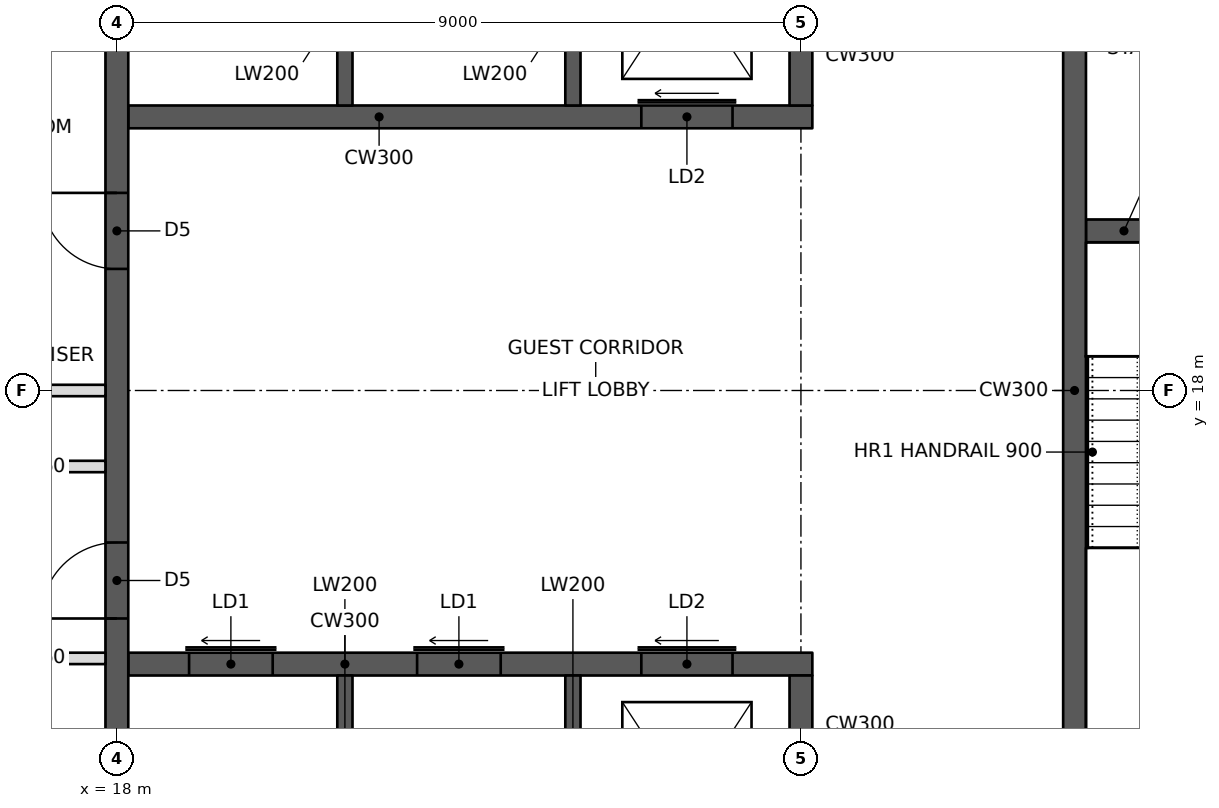
"""IFC4 building model, lengths in metres.
Left out: names, types, materials, properties, quantities, classifications, styles, units other than length and angle.
Written with IfcOpenShell. Run it as: python <this file> out.ifc"""

import sys

from ifc_helpers import new_model, si_unit, direction, frame, frame_2d, origin, place, context, subcontext, project, spatial, rectangle, extrude, element, fill, save


model = new_model("IFC4")
c1 = context("Model", 3, precision=1e-05, world=origin(), true_north=direction((0.0, 1.0)))
c2 = subcontext(c1, "Body", "Model", "MODEL_VIEW")
j1 = project(units=[si_unit("LENGTHUNIT", "METRE"), si_unit("PLANEANGLEUNIT", "RADIAN")], contexts=[c1])
p1 = place(None, origin())
s1 = spatial("IfcSite", under=j1, at=p1, CompositionType="ELEMENT")
p2 = place(p1, origin())
s2 = spatial("IfcBuilding", under=s1, at=p2, CompositionType="ELEMENT")
p3 = place(p2, frame((0.0, 0.0, 82.4)))
s3 = spatial("IfcBuildingStorey", under=s2, at=p3, CompositionType="ELEMENT", Elevation=82.4)
p4 = place(p3, frame((18.0, 11.4, 0.0), z_axis=(0.0, 0.0, 1.0), x_axis=(0.0, 1.0, 0.0)))
e1 = element("IfcWall", 1, at=p4, inside=s3, PredefinedType="SHEAR", context=c2, shape_type="SweptSolid", body=[
    extrude(rectangle(XDim=13.2, YDim=0.3, at=frame_2d((6.6, 0.0))), origin(), (0.0, 0.0, 1.0), 3.4),
])
p5 = place(p4, frame((3.6, 0.0, 0.0)))
e2 = element("IfcOpeningElement", 2, at=p5, cuts=e1, PredefinedType="OPENING", context=c2, shape_type="SweptSolid", body=[
    extrude(rectangle(XDim=1.0, YDim=2.1, at=frame_2d((0.5, 1.05))), frame((0.0, 0.16, 0.0), z_axis=(0.0, -1.0, 0.0), x_axis=(1.0, 0.0, 0.0)), (0.0, 0.0, 1.0), 0.32),
])
p6 = place(p4, frame((8.2, 0.0, 0.0)))
e3 = element("IfcOpeningElement", 3, at=p6, cuts=e1, PredefinedType="OPENING", context=c2, shape_type="SweptSolid", body=[
    extrude(rectangle(XDim=1.0, YDim=2.1, at=frame_2d((0.5, 1.05))), frame((0.0, 0.16, 0.0), z_axis=(0.0, -1.0, 0.0), x_axis=(1.0, 0.0, 0.0)), (0.0, 0.0, 1.0), 0.32),
])
p7 = place(p3, frame((14.55, 18.0, 0.0), z_axis=(0.0, 0.0, 1.0), x_axis=(1.0, 0.0, 0.0)))
e4 = element("IfcWall", 4, at=p7, inside=s3, PredefinedType="PARTITIONING", context=c2, shape_type="SweptSolid", body=[
    extrude(rectangle(XDim=3.3, YDim=0.15, at=frame_2d((1.65, 0.0))), origin(), (0.0, 0.0, 1.0), 3.2),
])
p8 = place(p3, frame((18.15, 14.4, 0.0), z_axis=(0.0, 0.0, 1.0), x_axis=(1.0, 0.0, 0.0)))
e5 = element("IfcWall", 5, at=p8, inside=s3, PredefinedType="SHEAR", context=c2, shape_type="SweptSolid", body=[
    extrude(rectangle(XDim=9.0, YDim=0.3, at=frame_2d((4.5, 0.0))), origin(), (0.0, 0.0, 1.0), 3.4),
])
p9 = place(p8, frame((0.8, 0.0, 0.0)))
e6 = element("IfcOpeningElement", 6, at=p9, cuts=e5, PredefinedType="OPENING", context=c2, shape_type="SweptSolid", body=[
    extrude(rectangle(XDim=1.1, YDim=2.1, at=frame_2d((0.55, 1.05))), frame((0.0, 0.16, 0.0), z_axis=(0.0, -1.0, 0.0), x_axis=(1.0, 0.0, 0.0)), (0.0, 0.0, 1.0), 0.32),
])
p10 = place(p8, frame((3.8, 0.0, 0.0)))
e7 = element("IfcOpeningElement", 7, at=p10, cuts=e5, PredefinedType="OPENING", context=c2, shape_type="SweptSolid", body=[
    extrude(rectangle(XDim=1.1, YDim=2.1, at=frame_2d((0.55, 1.05))), frame((0.0, 0.16, 0.0), z_axis=(0.0, -1.0, 0.0), x_axis=(1.0, 0.0, 0.0)), (0.0, 0.0, 1.0), 0.32),
])
p11 = place(p8, frame((6.75, 0.0, 0.0)))
e8 = element("IfcOpeningElement", 8, at=p11, cuts=e5, PredefinedType="OPENING", context=c2, shape_type="SweptSolid", body=[
    extrude(rectangle(XDim=1.2, YDim=2.1, at=frame_2d((0.6, 1.05))), frame((0.0, 0.16, 0.0), z_axis=(0.0, -1.0, 0.0), x_axis=(1.0, 0.0, 0.0)), (0.0, 0.0, 1.0), 0.32),
])
p12 = place(p3, frame((27.0, 11.4, 0.0), z_axis=(0.0, 0.0, 1.0), x_axis=(0.0, 1.0, 0.0)))
e9 = element("IfcWall", 9, at=p12, inside=s3, PredefinedType="SHEAR", context=c2, shape_type="SweptSolid", body=[
    extrude(rectangle(XDim=2.85, YDim=0.3, at=frame_2d((1.425, 0.0))), origin(), (0.0, 0.0, 1.0), 3.4),
])
for number, where, z_axis, x_axis in (
    (10, (21.0, 11.4, 0.0), (0.0, 0.0, 1.0), (0.0, 1.0, 0.0)),
    (11, (24.0, 11.4, 0.0), (0.0, 0.0, 1.0), (0.0, 1.0, 0.0)),
):
    element("IfcWall", number, at=place(p3, frame(where, z_axis=z_axis, x_axis=x_axis)), inside=s3, PredefinedType="SHEAR", context=c2, shape_type="SweptSolid", body=[
        extrude(rectangle(XDim=2.85, YDim=0.2, at=frame_2d((1.425, 0.0))), origin(), (0.0, 0.0, 1.0), 3.4),
    ])
p13 = place(p3, frame((18.15, 21.6, 0.0), z_axis=(0.0, 0.0, 1.0), x_axis=(1.0, 0.0, 0.0)))
e12 = element("IfcWall", 12, at=p13, inside=s3, PredefinedType="SHEAR", context=c2, shape_type="SweptSolid", body=[
    extrude(rectangle(XDim=9.0, YDim=0.3, at=frame_2d((4.5, 0.0))), origin(), (0.0, 0.0, 1.0), 3.4),
])
p14 = place(p13, frame((6.75, 0.0, 0.0)))
e13 = element("IfcOpeningElement", 13, at=p14, cuts=e12, PredefinedType="OPENING", context=c2, shape_type="SweptSolid", body=[
    extrude(rectangle(XDim=1.2, YDim=2.1, at=frame_2d((0.6, 1.05))), frame((0.0, 0.16, 0.0), z_axis=(0.0, -1.0, 0.0), x_axis=(1.0, 0.0, 0.0)), (0.0, 0.0, 1.0), 0.32),
])
p15 = place(p3, frame((27.0, 21.75, 0.0), z_axis=(0.0, 0.0, 1.0), x_axis=(0.0, 1.0, 0.0)))
e14 = element("IfcWall", 14, at=p15, inside=s3, PredefinedType="SHEAR", context=c2, shape_type="SweptSolid", body=[
    extrude(rectangle(XDim=2.85, YDim=0.3, at=frame_2d((1.425, 0.0))), origin(), (0.0, 0.0, 1.0), 3.4),
])
for number, where, z_axis, x_axis in (
    (15, (21.0, 21.75, 0.0), (0.0, 0.0, 1.0), (0.0, 1.0, 0.0)),
    (16, (24.0, 21.75, 0.0), (0.0, 0.0, 1.0), (0.0, 1.0, 0.0)),
):
    element("IfcWall", number, at=place(p3, frame(where, z_axis=z_axis, x_axis=x_axis)), inside=s3, PredefinedType="SHEAR", context=c2, shape_type="SweptSolid", body=[
        extrude(rectangle(XDim=2.85, YDim=0.2, at=frame_2d((1.425, 0.0))), origin(), (0.0, 0.0, 1.0), 3.4),
    ])
p16 = place(p3, frame((30.6, 11.4, 0.0), z_axis=(0.0, 0.0, 1.0), x_axis=(0.0, 1.0, 0.0)))
e17 = element("IfcWall", 17, at=p16, inside=s3, PredefinedType="SHEAR", context=c2, shape_type="SweptSolid", body=[
    extrude(rectangle(XDim=13.2, YDim=0.3, at=frame_2d((6.6, 0.0))), origin(), (0.0, 0.0, 1.0), 3.4),
])
p17 = place(p3, frame((30.75, 20.1, 0.0), z_axis=(0.0, 0.0, 1.0), x_axis=(1.0, 0.0, 0.0)))
e18 = element("IfcWall", 18, at=p17, inside=s3, PredefinedType="SHEAR", context=c2, shape_type="SweptSolid", body=[
    extrude(rectangle(XDim=2.85, YDim=0.3, at=frame_2d((1.425, 0.0))), origin(), (0.0, 0.0, 1.0), 3.4),
])
p18 = place(p17, frame((1.15, 0.0, 0.0)))
e19 = element("IfcOpeningElement", 19, at=p18, cuts=e18, PredefinedType="OPENING", context=c2, shape_type="SweptSolid", body=[
    extrude(rectangle(XDim=1.0, YDim=2.1, at=frame_2d((0.5, 1.05))), frame((0.0, 0.16, 0.0), z_axis=(0.0, -1.0, 0.0), x_axis=(1.0, 0.0, 0.0)), (0.0, 0.0, 1.0), 0.32),
])
p19 = place(p3, frame((14.55, 17.0, 0.0), z_axis=(0.0, 0.0, 1.0), x_axis=(1.0, 0.0, 0.0)))
e20 = element("IfcWall", 20, at=p19, inside=s3, PredefinedType="PARTITIONING", context=c2, shape_type="SweptSolid", body=[
    extrude(rectangle(XDim=3.3, YDim=0.15, at=frame_2d((1.65, 0.0))), origin(), (0.0, 0.0, 1.0), 3.2),
])
p20 = place(p19, frame((0.3, 0.0, 0.0)))
e21 = element("IfcOpeningElement", 21, at=p20, cuts=e20, PredefinedType="OPENING", context=c2, shape_type="SweptSolid", body=[
    extrude(rectangle(XDim=1.0, YDim=2.1, at=frame_2d((0.5, 1.05))), frame((0.0, 0.085, 0.0), z_axis=(0.0, -1.0, 0.0), x_axis=(1.0, 0.0, 0.0)), (0.0, 0.0, 1.0), 0.17),
])
p21 = place(p3, frame((14.55, 14.475, 0.0), z_axis=(0.0, 0.0, 1.0), x_axis=(1.0, 0.0, 0.0)))
e22 = element("IfcWall", 22, at=p21, inside=s3, PredefinedType="PARTITIONING", context=c2, shape_type="SweptSolid", body=[
    extrude(rectangle(XDim=3.3, YDim=0.15, at=frame_2d((1.65, 0.0))), origin(), (0.0, 0.0, 1.0), 3.2),
])
p22 = place(p21, frame((0.3, 0.0, 0.0)))
e23 = element("IfcOpeningElement", 23, at=p22, cuts=e22, PredefinedType="OPENING", context=c2, shape_type="SweptSolid", body=[
    extrude(rectangle(XDim=1.0, YDim=2.1, at=frame_2d((0.5, 1.05))), frame((0.0, 0.085, 0.0), z_axis=(0.0, -1.0, 0.0), x_axis=(1.0, 0.0, 0.0)), (0.0, 0.0, 1.0), 0.17),
])
p23 = place(p5, origin())
e24 = element("IfcDoor", 24, at=p23, inside=s3, OperationType="SINGLE_SWING_LEFT", PredefinedType="DOOR", context=c2, shape_type="SweptSolid", body=[
    extrude(rectangle(XDim=1.0, YDim=2.1, at=frame_2d((0.5, 1.05))), frame((0.0, 0.025, 0.0), z_axis=(0.0, -1.0, 0.0), x_axis=(1.0, 0.0, 0.0)), (0.0, 0.0, 1.0), 0.05),
])
fill(e2, e24)
p24 = place(p6, origin())
e25 = element("IfcDoor", 25, at=p24, inside=s3, OperationType="SINGLE_SWING_RIGHT", PredefinedType="DOOR", context=c2, shape_type="SweptSolid", body=[
    extrude(rectangle(XDim=1.0, YDim=2.1, at=frame_2d((0.5, 1.05))), frame((0.0, 0.025, 0.0), z_axis=(0.0, -1.0, 0.0), x_axis=(1.0, 0.0, 0.0)), (0.0, 0.0, 1.0), 0.05),
])
fill(e3, e25)
p25 = place(p9, origin())
e26 = element("IfcDoor", 26, at=p25, inside=s3, OperationType="SLIDING_TO_LEFT", PredefinedType="DOOR", context=c2, shape_type="SweptSolid", body=[
    extrude(rectangle(XDim=1.1, YDim=2.1, at=frame_2d((0.55, 1.05))), frame((0.0, 0.025, 0.0), z_axis=(0.0, -1.0, 0.0), x_axis=(1.0, 0.0, 0.0)), (0.0, 0.0, 1.0), 0.05),
])
fill(e6, e26)
p26 = place(p10, origin())
e27 = element("IfcDoor", 27, at=p26, inside=s3, OperationType="SLIDING_TO_LEFT", PredefinedType="DOOR", context=c2, shape_type="SweptSolid", body=[
    extrude(rectangle(XDim=1.1, YDim=2.1, at=frame_2d((0.55, 1.05))), frame((0.0, 0.025, 0.0), z_axis=(0.0, -1.0, 0.0), x_axis=(1.0, 0.0, 0.0)), (0.0, 0.0, 1.0), 0.05),
])
fill(e7, e27)
p27 = place(p11, origin())
e28 = element("IfcDoor", 28, at=p27, inside=s3, OperationType="SLIDING_TO_LEFT", PredefinedType="DOOR", context=c2, shape_type="SweptSolid", body=[
    extrude(rectangle(XDim=1.2, YDim=2.1, at=frame_2d((0.6, 1.05))), frame((0.0, 0.025, 0.0), z_axis=(0.0, -1.0, 0.0), x_axis=(1.0, 0.0, 0.0)), (0.0, 0.0, 1.0), 0.05),
])
fill(e8, e28)
p28 = place(p14, origin())
e29 = element("IfcDoor", 29, at=p28, inside=s3, OperationType="SLIDING_TO_LEFT", PredefinedType="DOOR", context=c2, shape_type="SweptSolid", body=[
    extrude(rectangle(XDim=1.2, YDim=2.1, at=frame_2d((0.6, 1.05))), frame((0.0, 0.025, 0.0), z_axis=(0.0, -1.0, 0.0), x_axis=(1.0, 0.0, 0.0)), (0.0, 0.0, 1.0), 0.05),
])
fill(e13, e29)
save(model, sys.argv[1])
